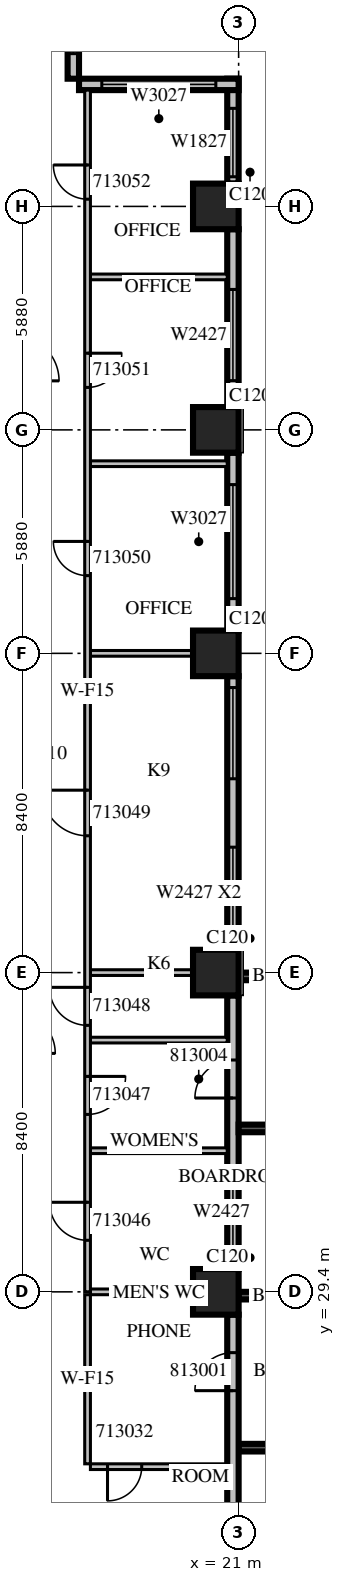
"""IFC4 building model, lengths in metres.
Left out: names, types, materials, properties, quantities, classifications, styles, units other than length and angle.
Written with IfcOpenShell. Run it as: python <this file> out.ifc"""

import sys

from ifc_helpers import new_model, si_unit, direction, frame, frame_2d, origin, origin_2d, place, context, subcontext, project, spatial, rectangle, extrude, source, transform, mapped, element, fill, save


model = new_model("IFC4")
c1 = context("Model", 3, precision=1e-05, world=origin(), true_north=direction((0.0, 1.0)))
c2 = subcontext(c1, "Body", "Model", "MODEL_VIEW")
j1 = project(units=[si_unit("LENGTHUNIT", "METRE"), si_unit("PLANEANGLEUNIT", "RADIAN")], contexts=[c1])
p1 = place(None, origin())
s1 = spatial("IfcSite", under=j1, at=p1, CompositionType="ELEMENT")
p2 = place(p1, origin())
s2 = spatial("IfcBuilding", under=s1, at=p2, CompositionType="ELEMENT")
p3 = place(p2, frame((0.0, 0.0, 65.7)))
s3 = spatial("IfcBuildingStorey", under=s2, at=p3, CompositionType="ELEMENT", Elevation=65.7)
m1 = source(origin(), c2, "Body", "SweptSolid", [
    extrude(rectangle(XDim=1.2, YDim=1.2, at=origin_2d()), origin(), (0.0, 0.0, 1.0), 4.2),
])
for number, where, z_axis, x_axis in (
    (1, (20.4, 29.4, 0.0), (0.0, 0.0, 1.0), (1.0, 0.0, 0.0)),
    (2, (20.4, 37.8, 0.0), (0.0, 0.0, 1.0), (1.0, 0.0, 0.0)),
    (3, (20.4, 46.2, 0.0), (0.0, 0.0, 1.0), (1.0, 0.0, 0.0)),
    (4, (20.4, 52.08, 0.0), (0.0, 0.0, 1.0), (1.0, 0.0, 0.0)),
    (5, (20.4, 57.96, 0.0), (0.0, 0.0, 1.0), (1.0, 0.0, 0.0)),
):
    element("IfcColumn", number, at=place(p3, frame(where, z_axis=z_axis, x_axis=x_axis)), inside=s3, PredefinedType="COLUMN", context=c2, shape_type="MappedRepresentation", body=[
        mapped(m1, transform((0.0, 0.0, 0.0), scale=1.0)),
    ])
m2 = source(origin(), c2, "Body", "SweptSolid", [
    extrude(rectangle(XDim=3.9, YDim=0.2, at=frame_2d((1.95, 0.0))), origin(), (0.0, 0.0, 1.0), 3.8),
])
p4 = place(p3, frame((21.0, 25.3, 0.0), z_axis=(0.0, 0.0, 1.0), x_axis=(1.0, 0.0, 0.0)))
e6 = element("IfcWall", 6, at=p4, inside=s3, PredefinedType="SOLIDWALL", context=c2, shape_type="MappedRepresentation", body=[
    mapped(m2, transform((0.0, 0.0, 0.0), scale=1.0)),
])
m3 = source(origin(), c2, "Body", "SweptSolid", [
    extrude(rectangle(XDim=2.4, YDim=2.7, at=frame_2d((1.2, 1.35))), frame((0.0, 0.11, 0.0), z_axis=(0.0, -1.0, 0.0), x_axis=(1.0, 0.0, 0.0)), (0.0, 0.0, 1.0), 0.22),
])
p5 = place(p4, frame((0.75, 0.0, 0.6)))
e7 = element("IfcOpeningElement", 7, at=p5, cuts=e6, PredefinedType="OPENING", context=c2, shape_type="MappedRepresentation", body=[
    mapped(m3, transform((0.0, 0.0, 0.0), scale=1.0)),
])
p6 = place(p3, frame((21.0, 29.3, 0.0), z_axis=(0.0, 0.0, 1.0), x_axis=(1.0, 0.0, 0.0)))
e8 = element("IfcWall", 8, at=p6, inside=s3, PredefinedType="SOLIDWALL", context=c2, shape_type="MappedRepresentation", body=[
    mapped(m2, transform((0.0, 0.0, 0.0), scale=1.0)),
])
p7 = place(p6, frame((0.75, 0.0, 0.6)))
e9 = element("IfcOpeningElement", 9, at=p7, cuts=e8, PredefinedType="OPENING", context=c2, shape_type="MappedRepresentation", body=[
    mapped(m3, transform((0.0, 0.0, 0.0), scale=1.0)),
])
m4 = source(origin(), c2, "Body", "SweptSolid", [
    extrude(rectangle(XDim=6.6, YDim=0.3, at=frame_2d((3.3, 0.0))), origin(), (0.0, 0.0, 1.0), 3.8),
])
p8 = place(p3, frame((20.85, 22.2, 0.0), z_axis=(0.0, 0.0, 1.0), x_axis=(0.0, 1.0, 0.0)))
e10 = element("IfcWall", 10, at=p8, inside=s3, PredefinedType="STANDARD", context=c2, shape_type="MappedRepresentation", body=[
    mapped(m4, transform((0.0, 0.0, 0.0), scale=1.0)),
])
m5 = source(origin(), c2, "Body", "SweptSolid", [
    extrude(rectangle(XDim=1.2, YDim=2.7, at=frame_2d((0.6, 1.35))), frame((0.0, 0.16, 0.0), z_axis=(0.0, -1.0, 0.0), x_axis=(1.0, 0.0, 0.0)), (0.0, 0.0, 1.0), 0.32),
])
p9 = place(p8, frame((0.3, 0.0, 0.6)))
e11 = element("IfcOpeningElement", 11, at=p9, cuts=e10, PredefinedType="OPENING", context=c2, shape_type="MappedRepresentation", body=[
    mapped(m5, transform((0.0, 0.0, 0.0), scale=1.0)),
])
m6 = source(origin(), c2, "Body", "SweptSolid", [
    extrude(rectangle(XDim=1.0, YDim=2.1, at=frame_2d((0.5, 1.05))), frame((0.0, 0.16, 0.0), z_axis=(0.0, -1.0, 0.0), x_axis=(1.0, 0.0, 0.0)), (0.0, 0.0, 1.0), 0.32),
])
p10 = place(p8, frame((4.6, 0.0, 0.0)))
e12 = element("IfcOpeningElement", 12, at=p10, cuts=e10, PredefinedType="OPENING", context=c2, shape_type="MappedRepresentation", body=[
    mapped(m6, transform((0.0, 0.0, 0.0), scale=1.0)),
])
m7 = source(origin(), c2, "Body", "SweptSolid", [
    extrude(rectangle(XDim=7.2, YDim=0.3, at=frame_2d((3.6, 0.0))), origin(), (0.0, 0.0, 1.0), 3.8),
])
p11 = place(p3, frame((20.85, 30.0, 0.0), z_axis=(0.0, 0.0, 1.0), x_axis=(0.0, 1.0, 0.0)))
e13 = element("IfcWall", 13, at=p11, inside=s3, PredefinedType="STANDARD", context=c2, shape_type="MappedRepresentation", body=[
    mapped(m7, transform((0.0, 0.0, 0.0), scale=1.0)),
])
m8 = source(origin(), c2, "Body", "SweptSolid", [
    extrude(rectangle(XDim=2.4, YDim=2.7, at=frame_2d((1.2, 1.35))), frame((0.0, 0.16, 0.0), z_axis=(0.0, -1.0, 0.0), x_axis=(1.0, 0.0, 0.0)), (0.0, 0.0, 1.0), 0.32),
])
p12 = place(p11, frame((0.3, 0.0, 0.6)))
e14 = element("IfcOpeningElement", 14, at=p12, cuts=e13, PredefinedType="OPENING", context=c2, shape_type="MappedRepresentation", body=[
    mapped(m8, transform((0.0, 0.0, 0.0), scale=1.0)),
])
p13 = place(p11, frame((4.5, 0.0, 0.0)))
e15 = element("IfcOpeningElement", 15, at=p13, cuts=e13, PredefinedType="OPENING", context=c2, shape_type="MappedRepresentation", body=[
    mapped(m6, transform((0.0, 0.0, 0.0), scale=1.0)),
])
p14 = place(p3, frame((20.85, 38.4, 0.0), z_axis=(0.0, 0.0, 1.0), x_axis=(0.0, 1.0, 0.0)))
e16 = element("IfcWall", 16, at=p14, inside=s3, PredefinedType="STANDARD", context=c2, shape_type="MappedRepresentation", body=[
    mapped(m7, transform((0.0, 0.0, 0.0), scale=1.0)),
])
p15 = place(p14, frame((0.3, 0.0, 0.6)))
e17 = element("IfcOpeningElement", 17, at=p15, cuts=e16, PredefinedType="OPENING", context=c2, shape_type="MappedRepresentation", body=[
    mapped(m8, transform((0.0, 0.0, 0.0), scale=1.0)),
])
p16 = place(p14, frame((4.5, 0.0, 0.6)))
e18 = element("IfcOpeningElement", 18, at=p16, cuts=e16, PredefinedType="OPENING", context=c2, shape_type="MappedRepresentation", body=[
    mapped(m8, transform((0.0, 0.0, 0.0), scale=1.0)),
])
m9 = source(origin(), c2, "Body", "SweptSolid", [
    extrude(rectangle(XDim=4.68, YDim=0.3, at=frame_2d((2.34, 0.0))), origin(), (0.0, 0.0, 1.0), 3.8),
])
p17 = place(p3, frame((20.85, 46.8, 0.0), z_axis=(0.0, 0.0, 1.0), x_axis=(0.0, 1.0, 0.0)))
e19 = element("IfcWall", 19, at=p17, inside=s3, PredefinedType="STANDARD", context=c2, shape_type="MappedRepresentation", body=[
    mapped(m9, transform((0.0, 0.0, 0.0), scale=1.0)),
])
m10 = source(origin(), c2, "Body", "SweptSolid", [
    extrude(rectangle(XDim=3.0, YDim=2.7, at=frame_2d((1.5, 1.35))), frame((0.0, 0.16, 0.0), z_axis=(0.0, -1.0, 0.0), x_axis=(1.0, 0.0, 0.0)), (0.0, 0.0, 1.0), 0.32),
])
p18 = place(p17, frame((0.84, 0.0, 0.6)))
e20 = element("IfcOpeningElement", 20, at=p18, cuts=e19, PredefinedType="OPENING", context=c2, shape_type="MappedRepresentation", body=[
    mapped(m10, transform((0.0, 0.0, 0.0), scale=1.0)),
])
p19 = place(p3, frame((20.85, 52.68, 0.0), z_axis=(0.0, 0.0, 1.0), x_axis=(0.0, 1.0, 0.0)))
e21 = element("IfcWall", 21, at=p19, inside=s3, PredefinedType="STANDARD", context=c2, shape_type="MappedRepresentation", body=[
    mapped(m9, transform((0.0, 0.0, 0.0), scale=1.0)),
])
p20 = place(p19, frame((0.695, 0.0, 0.6)))
e22 = element("IfcOpeningElement", 22, at=p20, cuts=e21, PredefinedType="OPENING", context=c2, shape_type="MappedRepresentation", body=[
    mapped(m8, transform((0.0, 0.0, 0.0), scale=1.0)),
])
m11 = source(origin(), c2, "Body", "SweptSolid", [
    extrude(rectangle(XDim=2.76, YDim=0.3, at=frame_2d((1.38, 0.0))), origin(), (0.0, 0.0, 1.0), 3.8),
])
p21 = place(p3, frame((20.85, 58.56, 0.0), z_axis=(0.0, 0.0, 1.0), x_axis=(0.0, 1.0, 0.0)))
e23 = element("IfcWall", 23, at=p21, inside=s3, PredefinedType="STANDARD", context=c2, shape_type="MappedRepresentation", body=[
    mapped(m11, transform((0.0, 0.0, 0.0), scale=1.0)),
])
m12 = source(origin(), c2, "Body", "SweptSolid", [
    extrude(rectangle(XDim=1.8, YDim=2.7, at=frame_2d((0.9, 1.35))), frame((0.0, 0.16, 0.0), z_axis=(0.0, -1.0, 0.0), x_axis=(1.0, 0.0, 0.0)), (0.0, 0.0, 1.0), 0.32),
])
p22 = place(p21, frame((0.18, 0.0, 0.6)))
e24 = element("IfcOpeningElement", 24, at=p22, cuts=e23, PredefinedType="OPENING", context=c2, shape_type="MappedRepresentation", body=[
    mapped(m12, transform((0.0, 0.0, 0.0), scale=1.0)),
])
m13 = source(origin(), c2, "Body", "SweptSolid", [
    extrude(rectangle(XDim=4.2, YDim=0.3, at=frame_2d((2.1, 0.0))), origin(), (0.0, 0.0, 1.0), 3.8),
])
p23 = place(p3, frame((21.0, 61.17, 0.0), z_axis=(0.0, 0.0, 1.0), x_axis=(-1.0, 0.0, 0.0)))
e25 = element("IfcWall", 25, at=p23, inside=s3, PredefinedType="STANDARD", context=c2, shape_type="MappedRepresentation", body=[
    mapped(m13, transform((0.0, 0.0, 0.0), scale=1.0)),
])
p24 = place(p23, frame((0.6, 0.0, 0.6)))
e26 = element("IfcOpeningElement", 26, at=p24, cuts=e25, PredefinedType="OPENING", context=c2, shape_type="MappedRepresentation", body=[
    mapped(m10, transform((0.0, 0.0, 0.0), scale=1.0)),
])
m14 = source(origin(), c2, "Body", "SweptSolid", [
    extrude(rectangle(XDim=2.52, YDim=0.3, at=frame_2d((1.26, 0.0))), origin(), (0.0, 0.0, 1.0), 3.8),
])
p25 = place(p3, frame((16.65, 61.32, 0.0), z_axis=(0.0, 0.0, 1.0), x_axis=(0.0, 1.0, 0.0)))
e27 = element("IfcWall", 27, at=p25, inside=s3, PredefinedType="STANDARD", context=c2, shape_type="MappedRepresentation", body=[
    mapped(m14, transform((0.0, 0.0, 0.0), scale=1.0)),
])
p26 = place(p25, frame((0.66, 0.0, 0.6)))
e28 = element("IfcOpeningElement", 28, at=p26, cuts=e27, PredefinedType="OPENING", context=c2, shape_type="MappedRepresentation", body=[
    mapped(m5, transform((0.0, 0.0, 0.0), scale=1.0)),
])
m15 = source(origin(), c2, "Body", "SweptSolid", [
    extrude(rectangle(XDim=3.9, YDim=0.2, at=frame_2d((1.95, 0.0))), origin(), (0.0, 0.0, 1.0), 3.79),
])
p27 = place(p3, frame((21.0, 33.7, 0.0), z_axis=(0.0, 0.0, 1.0), x_axis=(1.0, 0.0, 0.0)))
e29 = element("IfcWall", 29, at=p27, inside=s3, PredefinedType="SOLIDWALL", context=c2, shape_type="MappedRepresentation", body=[
    mapped(m15, transform((0.0, 0.0, 0.0), scale=1.0)),
])
p28 = place(p27, frame((0.75, 0.0, 0.6)))
e30 = element("IfcOpeningElement", 30, at=p28, cuts=e29, PredefinedType="OPENING", context=c2, shape_type="MappedRepresentation", body=[
    mapped(m3, transform((0.0, 0.0, 0.0), scale=1.0)),
])
p29 = place(p3, frame((21.0, 37.7, 0.0), z_axis=(0.0, 0.0, 1.0), x_axis=(1.0, 0.0, 0.0)))
e31 = element("IfcWall", 31, at=p29, inside=s3, PredefinedType="SOLIDWALL", context=c2, shape_type="MappedRepresentation", body=[
    mapped(m15, transform((0.0, 0.0, 0.0), scale=1.0)),
])
p30 = place(p29, frame((0.75, 0.0, 0.6)))
e32 = element("IfcOpeningElement", 32, at=p30, cuts=e31, PredefinedType="OPENING", context=c2, shape_type="MappedRepresentation", body=[
    mapped(m3, transform((0.0, 0.0, 0.0), scale=1.0)),
])
m16 = source(origin(), c2, "Body", "SweptSolid", [
    extrude(rectangle(XDim=3.6, YDim=0.15, at=frame_2d((1.8, 0.0))), origin(), (0.0, 0.0, 1.0), 3.8),
])
p31 = place(p3, frame((17.1, 24.8, 0.0), z_axis=(0.0, 0.0, 1.0), x_axis=(1.0, 0.0, 0.0)))
e33 = element("IfcWall", 33, at=p31, inside=s3, PredefinedType="PARTITIONING", context=c2, shape_type="MappedRepresentation", body=[
    mapped(m16, transform((0.0, 0.0, 0.0), scale=1.0)),
])
m17 = source(origin(), c2, "Body", "SweptSolid", [
    extrude(rectangle(XDim=0.9, YDim=2.1, at=frame_2d((0.45, 1.05))), frame((0.0, 0.085, 0.0), z_axis=(0.0, -1.0, 0.0), x_axis=(1.0, 0.0, 0.0)), (0.0, 0.0, 1.0), 0.17),
])
p32 = place(p31, frame((0.45, 0.0, 0.0)))
e34 = element("IfcOpeningElement", 34, at=p32, cuts=e33, PredefinedType="OPENING", context=c2, shape_type="MappedRepresentation", body=[
    mapped(m17, transform((0.0, 0.0, 0.0), scale=1.0)),
])
m18 = source(origin(), c2, "Body", "SweptSolid", [
    extrude(rectangle(XDim=4.45, YDim=0.15, at=frame_2d((2.225, 0.0))), origin(), (0.0, 0.0, 1.0), 3.8),
])
p33 = place(p3, frame((17.025, 29.325, 0.0), z_axis=(0.0, 0.0, 1.0), x_axis=(0.0, -1.0, 0.0)))
e35 = element("IfcWall", 35, at=p33, inside=s3, PredefinedType="PARTITIONING", context=c2, shape_type="MappedRepresentation", body=[
    mapped(m18, transform((0.0, 0.0, 0.0), scale=1.0)),
])
m19 = source(origin(), c2, "Body", "SweptSolid", [
    extrude(rectangle(XDim=2.701, YDim=0.15, at=frame_2d((1.351, 0.0))), origin(), (0.0, 0.0, 1.0), 3.8),
])
p34 = place(p3, frame((19.801, 29.4, 0.0), z_axis=(0.0, 0.0, 1.0), x_axis=(-1.0, 0.0, 0.0)))
e36 = element("IfcWall", 36, at=p34, inside=s3, PredefinedType="PARTITIONING", context=c2, shape_type="MappedRepresentation", body=[
    mapped(m19, transform((0.0, 0.0, 0.0), scale=1.0)),
])
for number, where, z_axis, x_axis in (
    (37, (17.1, 33.113, 0.0), (0.0, 0.0, 1.0), (1.0, 0.0, 0.0)),
    (38, (17.1, 36.024, 0.0), (0.0, 0.0, 1.0), (1.0, 0.0, 0.0)),
    (39, (17.1, 51.19, 0.0), (0.0, 0.0, 1.0), (1.0, 0.0, 0.0)),
    (40, (17.1, 56.105, 0.0), (0.0, 0.0, 1.0), (1.0, 0.0, 0.0)),
):
    element("IfcWall", number, at=place(p3, frame(where, z_axis=z_axis, x_axis=x_axis)), inside=s3, PredefinedType="PARTITIONING", context=c2, shape_type="MappedRepresentation", body=[
        mapped(m16, transform((0.0, 0.0, 0.0), scale=1.0)),
    ])
for number, where, z_axis, x_axis in (
    (41, (19.801, 37.8, 0.0), (0.0, 0.0, 1.0), (-1.0, 0.0, 0.0)),
    (42, (19.801, 46.2, 0.0), (0.0, 0.0, 1.0), (-1.0, 0.0, 0.0)),
):
    element("IfcWall", number, at=place(p3, frame(where, z_axis=z_axis, x_axis=x_axis)), inside=s3, PredefinedType="PARTITIONING", context=c2, shape_type="MappedRepresentation", body=[
        mapped(m19, transform((0.0, 0.0, 0.0), scale=1.0)),
    ])
m20 = source(origin(), c2, "Body", "SweptSolid", [
    extrude(rectangle(XDim=31.62, YDim=0.15, at=frame_2d((15.81, 0.0))), origin(), (0.0, 0.0, 1.0), 3.8),
])
p35 = place(p3, frame((17.025, 61.02, 0.0), z_axis=(0.0, 0.0, 1.0), x_axis=(0.0, -1.0, 0.0)))
e43 = element("IfcWall", 43, at=p35, inside=s3, PredefinedType="PARTITIONING", context=c2, shape_type="MappedRepresentation", body=[
    mapped(m20, transform((0.0, 0.0, 0.0), scale=1.0)),
])
m21 = source(origin(), c2, "Body", "SweptSolid", [
    extrude(rectangle(XDim=1.0, YDim=2.1, at=frame_2d((0.5, 1.05))), frame((0.0, 0.085, 0.0), z_axis=(0.0, -1.0, 0.0), x_axis=(1.0, 0.0, 0.0)), (0.0, 0.0, 1.0), 0.17),
])
p36 = place(p35, frame((29.263, 0.0, 0.0)))
e44 = element("IfcOpeningElement", 44, at=p36, cuts=e43, PredefinedType="OPENING", context=c2, shape_type="MappedRepresentation", body=[
    mapped(m21, transform((0.0, 0.0, 0.0), scale=1.0)),
])
p37 = place(p35, frame((25.951, 0.0, 0.0)))
e45 = element("IfcOpeningElement", 45, at=p37, cuts=e43, PredefinedType="OPENING", context=c2, shape_type="MappedRepresentation", body=[
    mapped(m21, transform((0.0, 0.0, 0.0), scale=1.0)),
])
p38 = place(p35, frame((23.608, 0.0, 0.0)))
e46 = element("IfcOpeningElement", 46, at=p38, cuts=e43, PredefinedType="OPENING", context=c2, shape_type="MappedRepresentation", body=[
    mapped(m21, transform((0.0, 0.0, 0.0), scale=1.0)),
])
m22 = source(origin(), c2, "Body", "SweptSolid", [
    extrude(rectangle(XDim=1.2, YDim=2.1, at=frame_2d((0.6, 1.05))), frame((0.0, 0.085, 0.0), z_axis=(0.0, -1.0, 0.0), x_axis=(1.0, 0.0, 0.0)), (0.0, 0.0, 1.0), 0.17),
])
p39 = place(p35, frame((18.42, 0.0, 0.0)))
e47 = element("IfcOpeningElement", 47, at=p39, cuts=e43, PredefinedType="OPENING", context=c2, shape_type="MappedRepresentation", body=[
    mapped(m22, transform((0.0, 0.0, 0.0), scale=1.0)),
])
p40 = place(p35, frame((11.875, 0.0, 0.0)))
e48 = element("IfcOpeningElement", 48, at=p40, cuts=e43, PredefinedType="OPENING", context=c2, shape_type="MappedRepresentation", body=[
    mapped(m17, transform((0.0, 0.0, 0.0), scale=1.0)),
])
p41 = place(p35, frame((6.923, 0.0, 0.0)))
e49 = element("IfcOpeningElement", 49, at=p41, cuts=e43, PredefinedType="OPENING", context=c2, shape_type="MappedRepresentation", body=[
    mapped(m17, transform((0.0, 0.0, 0.0), scale=1.0)),
])
p42 = place(p35, frame((1.97, 0.0, 0.0)))
e50 = element("IfcOpeningElement", 50, at=p42, cuts=e43, PredefinedType="OPENING", context=c2, shape_type="MappedRepresentation", body=[
    mapped(m17, transform((0.0, 0.0, 0.0), scale=1.0)),
])
m23 = source(origin(), c2, "Body", "SweptSolid", [
    extrude(rectangle(XDim=2.4, YDim=2.7, at=frame_2d((1.2, 1.35))), frame((0.0, 0.03, 0.0), z_axis=(0.0, -1.0, 0.0), x_axis=(1.0, 0.0, 0.0)), (0.0, 0.0, 1.0), 0.06),
])
p43 = place(p12, origin())
e51 = element("IfcWindow", 51, at=p43, inside=s3, PartitioningType="SINGLE_PANEL", PredefinedType="WINDOW", context=c2, shape_type="MappedRepresentation", body=[
    mapped(m23, transform((0.0, 0.0, 0.0), scale=1.0)),
])
fill(e14, e51)
p44 = place(p15, origin())
e52 = element("IfcWindow", 52, at=p44, inside=s3, PartitioningType="SINGLE_PANEL", PredefinedType="WINDOW", context=c2, shape_type="MappedRepresentation", body=[
    mapped(m23, transform((0.0, 0.0, 0.0), scale=1.0)),
])
fill(e17, e52)
p45 = place(p16, origin())
e53 = element("IfcWindow", 53, at=p45, inside=s3, PartitioningType="SINGLE_PANEL", PredefinedType="WINDOW", context=c2, shape_type="MappedRepresentation", body=[
    mapped(m23, transform((0.0, 0.0, 0.0), scale=1.0)),
])
fill(e18, e53)
m24 = source(origin(), c2, "Body", "SweptSolid", [
    extrude(rectangle(XDim=3.0, YDim=2.7, at=frame_2d((1.5, 1.35))), frame((0.0, 0.03, 0.0), z_axis=(0.0, -1.0, 0.0), x_axis=(1.0, 0.0, 0.0)), (0.0, 0.0, 1.0), 0.06),
])
p46 = place(p18, origin())
e54 = element("IfcWindow", 54, at=p46, inside=s3, PartitioningType="SINGLE_PANEL", PredefinedType="WINDOW", context=c2, shape_type="MappedRepresentation", body=[
    mapped(m24, transform((0.0, 0.0, 0.0), scale=1.0)),
])
fill(e20, e54)
p47 = place(p20, origin())
e55 = element("IfcWindow", 55, at=p47, inside=s3, PartitioningType="SINGLE_PANEL", PredefinedType="WINDOW", context=c2, shape_type="MappedRepresentation", body=[
    mapped(m23, transform((0.0, 0.0, 0.0), scale=1.0)),
])
fill(e22, e55)
m25 = source(origin(), c2, "Body", "SweptSolid", [
    extrude(rectangle(XDim=1.8, YDim=2.7, at=frame_2d((0.9, 1.35))), frame((0.0, 0.03, 0.0), z_axis=(0.0, -1.0, 0.0), x_axis=(1.0, 0.0, 0.0)), (0.0, 0.0, 1.0), 0.06),
])
p48 = place(p22, origin())
e56 = element("IfcWindow", 56, at=p48, inside=s3, PartitioningType="SINGLE_PANEL", PredefinedType="WINDOW", context=c2, shape_type="MappedRepresentation", body=[
    mapped(m25, transform((0.0, 0.0, 0.0), scale=1.0)),
])
fill(e24, e56)
p49 = place(p24, origin())
e57 = element("IfcWindow", 57, at=p49, inside=s3, PartitioningType="SINGLE_PANEL", PredefinedType="WINDOW", context=c2, shape_type="MappedRepresentation", body=[
    mapped(m24, transform((0.0, 0.0, 0.0), scale=1.0)),
])
fill(e26, e57)
m26 = source(origin(), c2, "Body", "SweptSolid", [
    extrude(rectangle(XDim=1.2, YDim=2.7, at=frame_2d((0.6, 1.35))), frame((0.0, 0.03, 0.0), z_axis=(0.0, -1.0, 0.0), x_axis=(1.0, 0.0, 0.0)), (0.0, 0.0, 1.0), 0.06),
])
p50 = place(p26, origin())
e58 = element("IfcWindow", 58, at=p50, inside=s3, PartitioningType="SINGLE_PANEL", PredefinedType="WINDOW", context=c2, shape_type="MappedRepresentation", body=[
    mapped(m26, transform((0.0, 0.0, 0.0), scale=1.0)),
])
fill(e28, e58)
m27 = source(origin(), c2, "Body", "SweptSolid", [
    extrude(rectangle(XDim=0.9, YDim=2.1, at=frame_2d((0.45, 1.05))), frame((0.0, 0.025, 0.0), z_axis=(0.0, -1.0, 0.0), x_axis=(1.0, 0.0, 0.0)), (0.0, 0.0, 1.0), 0.05),
])
p51 = place(p32, origin())
e59 = element("IfcDoor", 59, at=p51, inside=s3, OperationType="SINGLE_SWING_RIGHT", PredefinedType="DOOR", context=c2, shape_type="MappedRepresentation", body=[
    mapped(m27, transform((0.0, 0.0, 0.0), scale=1.0)),
])
fill(e34, e59)
m28 = source(origin(), c2, "Body", "SweptSolid", [
    extrude(rectangle(XDim=1.0, YDim=2.1, at=frame_2d((0.5, 1.05))), frame((0.0, 0.025, 0.0), z_axis=(0.0, -1.0, 0.0), x_axis=(1.0, 0.0, 0.0)), (0.0, 0.0, 1.0), 0.05),
])
p52 = place(p36, origin())
e60 = element("IfcDoor", 60, at=p52, inside=s3, OperationType="SINGLE_SWING_RIGHT", PredefinedType="DOOR", context=c2, shape_type="MappedRepresentation", body=[
    mapped(m28, transform((0.0, 0.0, 0.0), scale=1.0)),
])
fill(e44, e60)
p53 = place(p37, origin())
e61 = element("IfcDoor", 61, at=p53, inside=s3, OperationType="SINGLE_SWING_LEFT", PredefinedType="DOOR", context=c2, shape_type="MappedRepresentation", body=[
    mapped(m28, transform((0.0, 0.0, 0.0), scale=1.0)),
])
fill(e45, e61)
p54 = place(p38, origin())
e62 = element("IfcDoor", 62, at=p54, inside=s3, OperationType="SINGLE_SWING_RIGHT", PredefinedType="DOOR", context=c2, shape_type="MappedRepresentation", body=[
    mapped(m28, transform((0.0, 0.0, 0.0), scale=1.0)),
])
fill(e46, e62)
m29 = source(origin(), c2, "Body", "SweptSolid", [
    extrude(rectangle(XDim=1.2, YDim=2.1, at=frame_2d((0.6, 1.05))), frame((0.0, 0.025, 0.0), z_axis=(0.0, -1.0, 0.0), x_axis=(1.0, 0.0, 0.0)), (0.0, 0.0, 1.0), 0.05),
])
p55 = place(p39, origin())
e63 = element("IfcDoor", 63, at=p55, inside=s3, OperationType="SINGLE_SWING_RIGHT", PredefinedType="DOOR", context=c2, shape_type="MappedRepresentation", body=[
    mapped(m29, transform((0.0, 0.0, 0.0), scale=1.0)),
])
fill(e47, e63)
p56 = place(p40, origin())
e64 = element("IfcDoor", 64, at=p56, inside=s3, OperationType="SINGLE_SWING_RIGHT", PredefinedType="DOOR", context=c2, shape_type="MappedRepresentation", body=[
    mapped(m27, transform((0.0, 0.0, 0.0), scale=1.0)),
])
fill(e48, e64)
p57 = place(p41, origin())
e65 = element("IfcDoor", 65, at=p57, inside=s3, OperationType="SINGLE_SWING_LEFT", PredefinedType="DOOR", context=c2, shape_type="MappedRepresentation", body=[
    mapped(m27, transform((0.0, 0.0, 0.0), scale=1.0)),
])
fill(e49, e65)
p58 = place(p42, origin())
e66 = element("IfcDoor", 66, at=p58, inside=s3, OperationType="SINGLE_SWING_RIGHT", PredefinedType="DOOR", context=c2, shape_type="MappedRepresentation", body=[
    mapped(m27, transform((0.0, 0.0, 0.0), scale=1.0)),
])
fill(e50, e66)
p59 = place(p10, origin())
e67 = element("IfcDoor", 67, at=p59, inside=s3, OperationType="SINGLE_SWING_LEFT", PredefinedType="DOOR", context=c2, shape_type="MappedRepresentation", body=[
    mapped(m28, transform((0.0, 0.0, 0.0), scale=1.0)),
])
fill(e12, e67)
p60 = place(p13, origin())
e68 = element("IfcDoor", 68, at=p60, inside=s3, OperationType="SINGLE_SWING_LEFT", PredefinedType="DOOR", context=c2, shape_type="MappedRepresentation", body=[
    mapped(m28, transform((0.0, 0.0, 0.0), scale=1.0)),
])
fill(e15, e68)
save(model, sys.argv[1])
